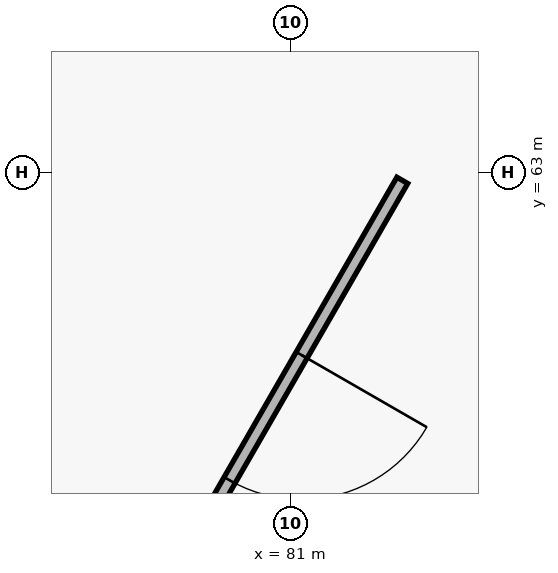
"""IFC4 building model, lengths in metres.
Left out: names, types, materials, properties, quantities, classifications, styles, units other than length and angle.
Written with IfcOpenShell. Run it as: python <this file> out.ifc"""

import sys

from ifc_helpers import new_model, si_unit, direction, frame, frame_2d, origin, place, context, subcontext, project, spatial, rectangle, extrude, element, fill, save


model = new_model("IFC4")
c1 = context("Model", 3, precision=1e-05, world=origin(), true_north=direction((0.0, 1.0)))
c2 = subcontext(c1, "Body", "Model", "MODEL_VIEW")
j1 = project(units=[si_unit("LENGTHUNIT", "METRE"), si_unit("PLANEANGLEUNIT", "RADIAN")], contexts=[c1])
p1 = place(None, origin())
s1 = spatial("IfcSite", under=j1, at=p1, CompositionType="ELEMENT")
p2 = place(p1, origin())
s2 = spatial("IfcBuilding", under=s1, at=p2, CompositionType="ELEMENT")
p3 = place(p2, origin())
s3 = spatial("IfcBuildingStorey", under=s2, at=p3, CompositionType="ELEMENT", Elevation=0.0)
p4 = place(p3, frame((82.469, 62.899, 0.0), z_axis=(0.0, 0.0, 1.0), x_axis=(-0.499109384588, -0.866538990592, 0.0)))
e1 = element("IfcWall", 1, at=p4, inside=s3, PredefinedType="PARTITIONING", context=c2, shape_type="SweptSolid", body=[
    extrude(rectangle(XDim=7.207, YDim=0.165, at=frame_2d((3.604, 0.0))), origin(), (0.0, 0.0, 1.0), 4.3),
])
p5 = place(p4, frame((2.653, 0.0, 0.0)))
e2 = element("IfcOpeningElement", 2, at=p5, cuts=e1, PredefinedType="OPENING", context=c2, shape_type="SweptSolid", body=[
    extrude(rectangle(XDim=1.9, YDim=2.35, at=frame_2d((0.95, 1.175))), frame((0.0, 0.093, 0.0), z_axis=(0.0, -1.0, 0.0), x_axis=(1.0, 0.0, 0.0)), (0.0, 0.0, 1.0), 0.185),
])
p6 = place(p5, origin())
e3 = element("IfcDoor", 3, at=p6, inside=s3, OperationType="DOUBLE_DOOR_SINGLE_SWING", PredefinedType="DOOR", context=c2, shape_type="SweptSolid", body=[
    extrude(rectangle(XDim=1.9, YDim=2.35, at=frame_2d((0.95, 1.175))), frame((0.0, 0.025, 0.0), z_axis=(0.0, -1.0, 0.0), x_axis=(1.0, 0.0, 0.0)), (0.0, 0.0, 1.0), 0.05),
])
fill(e2, e3)
save(model, sys.argv[1])
